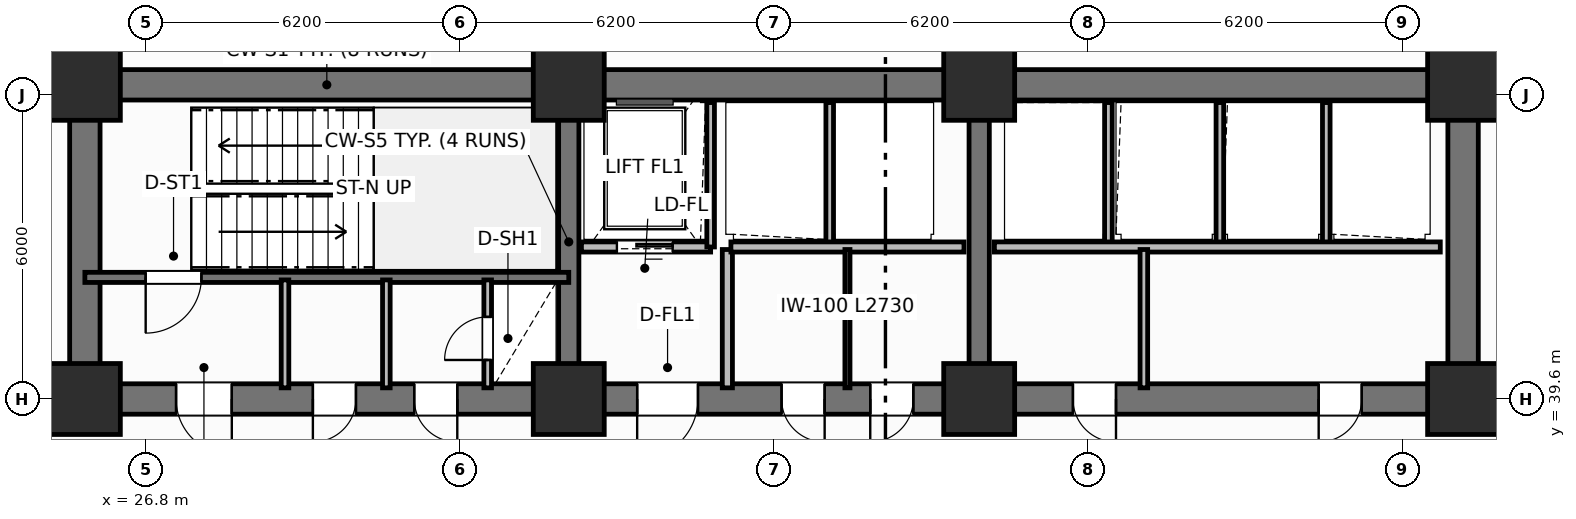
"""IFC4 building model, lengths in metres.
Left out: names, types, materials, properties, quantities, classifications, styles, units other than length and angle.
Written with IfcOpenShell. Run it as: python <this file> out.ifc"""

import sys

from ifc_helpers import new_model, si_unit, direction, frame, frame_2d, origin, origin_2d, place, context, subcontext, project, spatial, rectangle, extrude, element, fill, save


model = new_model("IFC4")
c1 = context("Model", 3, precision=1e-05, world=origin(), true_north=direction((0.0, 1.0)))
c2 = subcontext(c1, "Body", "Model", "MODEL_VIEW")
j1 = project(units=[si_unit("LENGTHUNIT", "METRE"), si_unit("PLANEANGLEUNIT", "RADIAN")], contexts=[c1])
p1 = place(None, origin())
s1 = spatial("IfcSite", under=j1, at=p1, CompositionType="ELEMENT")
p2 = place(p1, origin())
s2 = spatial("IfcBuilding", under=s1, at=p2, CompositionType="ELEMENT")
p3 = place(p2, frame((0.0, 0.0, 15.6)))
s3 = spatial("IfcBuildingStorey", under=s2, at=p3, CompositionType="ELEMENT", Elevation=15.6)
p4 = place(p3, frame((25.6, 45.8, 0.0), z_axis=(0.0, 0.0, 1.0), x_axis=(1.0, 0.0, 0.0)))
e1 = element("IfcWall", 1, at=p4, inside=s3, PredefinedType="SHEAR", context=c2, shape_type="SweptSolid", body=[
    extrude(rectangle(XDim=27.2, YDim=0.6, at=frame_2d((13.6, 0.0))), origin(), (0.0, 0.0, 1.0), 4.5),
])
for number, where, z_axis, x_axis in (
    (2, (25.6, 39.9, 0.0), (0.0, 0.0, 1.0), (0.0, 1.0, 0.0)),
    (3, (52.8, 39.9, 0.0), (0.0, 0.0, 1.0), (0.0, 1.0, 0.0)),
):
    element("IfcWall", number, at=place(p3, frame(where, z_axis=z_axis, x_axis=x_axis)), inside=s3, PredefinedType="SHEAR", context=c2, shape_type="SweptSolid", body=[
        extrude(rectangle(XDim=5.6, YDim=0.6, at=frame_2d((2.8, 0.0))), origin(), (0.0, 0.0, 1.0), 4.5),
    ])
p5 = place(p3, frame((52.8, 39.6, 0.0), z_axis=(0.0, 0.0, 1.0), x_axis=(-1.0, 0.0, 0.0)))
e4 = element("IfcWall", 4, at=p5, inside=s3, PredefinedType="SHEAR", context=c2, shape_type="SweptSolid", body=[
    extrude(rectangle(XDim=27.2, YDim=0.6, at=frame_2d((13.6, 0.0))), origin(), (0.0, 0.0, 1.0), 4.5),
])
p6 = place(p5, frame((24.3, 0.0, 0.0)))
e5 = element("IfcOpeningElement", 5, at=p6, cuts=e4, PredefinedType="OPENING", context=c2, shape_type="SweptSolid", body=[
    extrude(rectangle(XDim=1.1, YDim=2.15, at=frame_2d((0.55, 1.075))), frame((0.0, 0.31, 0.0), z_axis=(0.0, -1.0, 0.0), x_axis=(1.0, 0.0, 0.0)), (0.0, 0.0, 1.0), 0.62),
])
p7 = place(p5, frame((21.85, 0.0, 0.0)))
e6 = element("IfcOpeningElement", 6, at=p7, cuts=e4, PredefinedType="OPENING", context=c2, shape_type="SweptSolid", body=[
    extrude(rectangle(XDim=0.85, YDim=2.1, at=frame_2d((0.425, 1.05))), frame((0.0, 0.31, 0.0), z_axis=(0.0, -1.0, 0.0), x_axis=(1.0, 0.0, 0.0)), (0.0, 0.0, 1.0), 0.62),
])
p8 = place(p5, frame((19.85, 0.0, 0.0)))
e7 = element("IfcOpeningElement", 7, at=p8, cuts=e4, PredefinedType="OPENING", context=c2, shape_type="SweptSolid", body=[
    extrude(rectangle(XDim=0.85, YDim=2.1, at=frame_2d((0.425, 1.05))), frame((0.0, 0.31, 0.0), z_axis=(0.0, -1.0, 0.0), x_axis=(1.0, 0.0, 0.0)), (0.0, 0.0, 1.0), 0.62),
])
p9 = place(p5, frame((15.1, 0.0, 0.0)))
e8 = element("IfcOpeningElement", 8, at=p9, cuts=e4, PredefinedType="OPENING", context=c2, shape_type="SweptSolid", body=[
    extrude(rectangle(XDim=1.2, YDim=2.15, at=frame_2d((0.6, 1.075))), frame((0.0, 0.31, 0.0), z_axis=(0.0, -1.0, 0.0), x_axis=(1.0, 0.0, 0.0)), (0.0, 0.0, 1.0), 0.62),
])
p10 = place(p5, frame((12.6, 0.0, 0.0)))
e9 = element("IfcOpeningElement", 9, at=p10, cuts=e4, PredefinedType="OPENING", context=c2, shape_type="SweptSolid", body=[
    extrude(rectangle(XDim=0.85, YDim=2.1, at=frame_2d((0.425, 1.05))), frame((0.0, 0.31, 0.0), z_axis=(0.0, -1.0, 0.0), x_axis=(1.0, 0.0, 0.0)), (0.0, 0.0, 1.0), 0.62),
])
p11 = place(p5, frame((10.85, 0.0, 0.0)))
e10 = element("IfcOpeningElement", 10, at=p11, cuts=e4, PredefinedType="OPENING", context=c2, shape_type="SweptSolid", body=[
    extrude(rectangle(XDim=0.85, YDim=2.1, at=frame_2d((0.425, 1.05))), frame((0.0, 0.31, 0.0), z_axis=(0.0, -1.0, 0.0), x_axis=(1.0, 0.0, 0.0)), (0.0, 0.0, 1.0), 0.62),
])
p12 = place(p5, frame((6.85, 0.0, 0.0)))
e11 = element("IfcOpeningElement", 11, at=p12, cuts=e4, PredefinedType="OPENING", context=c2, shape_type="SweptSolid", body=[
    extrude(rectangle(XDim=0.85, YDim=2.1, at=frame_2d((0.425, 1.05))), frame((0.0, 0.31, 0.0), z_axis=(0.0, -1.0, 0.0), x_axis=(1.0, 0.0, 0.0)), (0.0, 0.0, 1.0), 0.62),
])
p13 = place(p5, frame((2.0, 0.0, 0.0)))
e12 = element("IfcOpeningElement", 12, at=p13, cuts=e4, PredefinedType="OPENING", context=c2, shape_type="SweptSolid", body=[
    extrude(rectangle(XDim=0.85, YDim=2.1, at=frame_2d((0.425, 1.05))), frame((0.0, 0.31, 0.0), z_axis=(0.0, -1.0, 0.0), x_axis=(1.0, 0.0, 0.0)), (0.0, 0.0, 1.0), 0.62),
])
for number, where, z_axis, x_axis in (
    (13, (35.15, 39.9, 0.0), (0.0, 0.0, 1.0), (0.0, 1.0, 0.0)),
    (14, (43.25, 39.9, 0.0), (0.0, 0.0, 1.0), (0.0, 1.0, 0.0)),
):
    element("IfcWall", number, at=place(p3, frame(where, z_axis=z_axis, x_axis=x_axis)), inside=s3, PredefinedType="SHEAR", context=c2, shape_type="SweptSolid", body=[
        extrude(rectangle(XDim=5.6, YDim=0.4, at=frame_2d((2.8, 0.0))), origin(), (0.0, 0.0, 1.0), 4.5),
    ])
for number, where, z_axis, x_axis in (
    (15, (25.6, 39.6, 0.0), (0.0, 0.0, 1.0), (1.0, 0.0, 0.0)),
    (16, (25.6, 45.8, 0.0), (0.0, 0.0, 1.0), (1.0, 0.0, 0.0)),
    (17, (35.15, 39.6, 0.0), (0.0, 0.0, 1.0), (1.0, 0.0, 0.0)),
    (18, (35.15, 45.8, 0.0), (0.0, 0.0, 1.0), (1.0, 0.0, 0.0)),
    (19, (43.25, 39.6, 0.0), (0.0, 0.0, 1.0), (1.0, 0.0, 0.0)),
    (20, (43.25, 45.8, 0.0), (0.0, 0.0, 1.0), (1.0, 0.0, 0.0)),
    (21, (52.8, 39.6, 0.0), (0.0, 0.0, 1.0), (1.0, 0.0, 0.0)),
    (22, (52.8, 45.8, 0.0), (0.0, 0.0, 1.0), (1.0, 0.0, 0.0)),
):
    element("IfcColumn", number, at=place(p3, frame(where, z_axis=z_axis, x_axis=x_axis)), inside=s3, PredefinedType="COLUMN", context=c2, shape_type="SweptSolid", body=[
        extrude(rectangle(XDim=1.4, YDim=1.4, at=origin_2d()), origin(), (0.0, 0.0, 1.0), 4.5),
    ])
p14 = place(p3, frame((35.15, 42.0, 0.0), z_axis=(0.0, 0.0, 1.0), x_axis=(-1.0, 0.0, 0.0)))
e23 = element("IfcWall", 23, at=p14, inside=s3, PredefinedType="SHEAR", context=c2, shape_type="SweptSolid", body=[
    extrude(rectangle(XDim=9.55, YDim=0.2, at=frame_2d((4.775, 0.0))), origin(), (0.0, 0.0, 1.0), 4.5),
])
p15 = place(p14, frame((7.25, 0.0, 0.0)))
e24 = element("IfcOpeningElement", 24, at=p15, cuts=e23, PredefinedType="OPENING", context=c2, shape_type="SweptSolid", body=[
    extrude(rectangle(XDim=1.1, YDim=2.15, at=frame_2d((0.55, 1.075))), frame((0.0, 0.11, 0.0), z_axis=(0.0, -1.0, 0.0), x_axis=(1.0, 0.0, 0.0)), (0.0, 0.0, 1.0), 0.22),
])
p16 = place(p3, frame((33.55, 39.82, 0.0), z_axis=(0.0, 0.0, 1.0), x_axis=(0.0, 1.0, 0.0)))
e25 = element("IfcWall", 25, at=p16, inside=s3, PredefinedType="PARTITIONING", context=c2, shape_type="SweptSolid", body=[
    extrude(rectangle(XDim=2.13, YDim=0.15, at=frame_2d((1.065, 0.0))), origin(), (0.0, 0.0, 1.0), 3.42),
])
p17 = place(p16, frame((0.55, 0.0, 0.0)))
e26 = element("IfcOpeningElement", 26, at=p17, cuts=e25, PredefinedType="OPENING", context=c2, shape_type="SweptSolid", body=[
    extrude(rectangle(XDim=0.85, YDim=2.05, at=frame_2d((0.425, 1.025))), frame((0.0, 0.085, 0.0), z_axis=(0.0, -1.0, 0.0), x_axis=(1.0, 0.0, 0.0)), (0.0, 0.0, 1.0), 0.17),
])
for number, where, z_axis, x_axis in (
    (27, (29.55, 39.82, 0.0), (0.0, 0.0, 1.0), (0.0, 1.0, 0.0)),
    (28, (31.55, 39.82, 0.0), (0.0, 0.0, 1.0), (0.0, 1.0, 0.0)),
):
    element("IfcWall", number, at=place(p3, frame(where, z_axis=z_axis, x_axis=x_axis)), inside=s3, PredefinedType="PARTITIONING", context=c2, shape_type="SweptSolid", body=[
        extrude(rectangle(XDim=2.13, YDim=0.15, at=frame_2d((1.065, 0.0))), origin(), (0.0, 0.0, 1.0), 3.42),
    ])
p18 = place(p3, frame((37.95, 42.6, 0.0), z_axis=(0.0, 0.0, 1.0), x_axis=(-1.0, 0.0, 0.0)))
e29 = element("IfcWall", 29, at=p18, inside=s3, PredefinedType="PARTITIONING", context=c2, shape_type="SweptSolid", body=[
    extrude(rectangle(XDim=2.55, YDim=0.2, at=frame_2d((1.275, 0.0))), origin(), (0.0, 0.0, 1.0), 3.08),
])
p19 = place(p18, frame((0.75, 0.0, 0.0)))
e30 = element("IfcOpeningElement", 30, at=p19, cuts=e29, PredefinedType="OPENING", context=c2, shape_type="SweptSolid", body=[
    extrude(rectangle(XDim=1.1, YDim=2.15, at=frame_2d((0.55, 1.075))), frame((0.0, 0.11, 0.0), z_axis=(0.0, -1.0, 0.0), x_axis=(1.0, 0.0, 0.0)), (0.0, 0.0, 1.0), 0.22),
])
p20 = place(p3, frame((37.95, 42.6, 0.0), z_axis=(0.0, 0.0, 1.0), x_axis=(0.0, 1.0, 0.0)))
e31 = element("IfcWall", 31, at=p20, inside=s3, PredefinedType="PARTITIONING", context=c2, shape_type="SweptSolid", body=[
    extrude(rectangle(XDim=2.85, YDim=0.15, at=frame_2d((1.425, 0.0))), origin(), (0.0, 0.0, 1.0), 3.42),
])
p21 = place(p3, frame((38.28, 39.82, 0.0), z_axis=(0.0, 0.0, 1.0), x_axis=(0.0, 1.0, 0.0)))
e32 = element("IfcWall", 32, at=p21, inside=s3, PredefinedType="PARTITIONING", context=c2, shape_type="SweptSolid", body=[
    extrude(rectangle(XDim=2.73, YDim=0.2, at=frame_2d((1.365, 0.0))), origin(), (0.0, 0.0, 1.0), 3.42),
])
p22 = place(p3, frame((40.3, 42.65, 0.0), z_axis=(0.0, 0.0, 1.0), x_axis=(0.0, 1.0, 0.0)))
e33 = element("IfcWall", 33, at=p22, inside=s3, PredefinedType="PARTITIONING", context=c2, shape_type="SweptSolid", body=[
    extrude(rectangle(XDim=2.8, YDim=0.15, at=frame_2d((1.4, 0.0))), origin(), (0.0, 0.0, 1.0), 3.42),
])
p23 = place(p3, frame((42.95, 42.6, 0.0), z_axis=(0.0, 0.0, 1.0), x_axis=(-1.0, 0.0, 0.0)))
e34 = element("IfcWall", 34, at=p23, inside=s3, PredefinedType="PARTITIONING", context=c2, shape_type="SweptSolid", body=[
    extrude(rectangle(XDim=4.6, YDim=0.2, at=frame_2d((2.3, 0.0))), origin(), (0.0, 0.0, 1.0), 3.08),
])
p24 = place(p3, frame((40.65, 39.82, 0.0), z_axis=(0.0, 0.0, 1.0), x_axis=(0.0, 1.0, 0.0)))
e35 = element("IfcWall", 35, at=p24, inside=s3, PredefinedType="PARTITIONING", context=c2, shape_type="SweptSolid", body=[
    extrude(rectangle(XDim=2.73, YDim=0.1, at=frame_2d((1.365, 0.0))), origin(), (0.0, 0.0, 1.0), 3.42),
])
for number, where, z_axis, x_axis in (
    (36, (45.8, 42.65, 0.0), (0.0, 0.0, 1.0), (0.0, 1.0, 0.0)),
    (37, (48.0, 42.65, 0.0), (0.0, 0.0, 1.0), (0.0, 1.0, 0.0)),
    (38, (50.1, 42.65, 0.0), (0.0, 0.0, 1.0), (0.0, 1.0, 0.0)),
):
    element("IfcWall", number, at=place(p3, frame(where, z_axis=z_axis, x_axis=x_axis)), inside=s3, PredefinedType="PARTITIONING", context=c2, shape_type="SweptSolid", body=[
        extrude(rectangle(XDim=2.8, YDim=0.15, at=frame_2d((1.4, 0.0))), origin(), (0.0, 0.0, 1.0), 3.42),
    ])
p25 = place(p3, frame((52.35, 42.6, 0.0), z_axis=(0.0, 0.0, 1.0), x_axis=(-1.0, 0.0, 0.0)))
e39 = element("IfcWall", 39, at=p25, inside=s3, PredefinedType="PARTITIONING", context=c2, shape_type="SweptSolid", body=[
    extrude(rectangle(XDim=8.8, YDim=0.2, at=frame_2d((4.4, 0.0))), origin(), (0.0, 0.0, 1.0), 3.42),
])
p26 = place(p3, frame((46.5, 39.82, 0.0), z_axis=(0.0, 0.0, 1.0), x_axis=(0.0, 1.0, 0.0)))
e40 = element("IfcWall", 40, at=p26, inside=s3, PredefinedType="PARTITIONING", context=c2, shape_type="SweptSolid", body=[
    extrude(rectangle(XDim=2.73, YDim=0.15, at=frame_2d((1.365, 0.0))), origin(), (0.0, 0.0, 1.0), 3.42),
])
p27 = place(p3, frame((25.25, 39.55, 0.0), z_axis=(0.0, 0.0, 1.0), x_axis=(-1.0, 0.0, 0.0)))
e41 = element("IfcWall", 41, at=p27, inside=s3, PredefinedType="PARTITIONING", context=c2, shape_type="SweptSolid", body=[
    extrude(rectangle(XDim=13.25, YDim=0.15, at=frame_2d((6.625, 0.0))), origin(), (0.0, 0.0, 1.0), 3.42),
])
p28 = place(p27, frame((4.2, 0.0, 0.0)))
e42 = element("IfcOpeningElement", 42, at=p28, cuts=e41, PredefinedType="OPENING", context=c2, shape_type="SweptSolid", body=[
    extrude(rectangle(XDim=1.0, YDim=2.15, at=frame_2d((0.5, 1.075))), frame((0.0, 0.085, 0.0), z_axis=(0.0, -1.0, 0.0), x_axis=(1.0, 0.0, 0.0)), (0.0, 0.0, 1.0), 0.17),
])
p29 = place(p3, frame((66.4, 39.55, 0.0), z_axis=(0.0, 0.0, 1.0), x_axis=(-1.0, 0.0, 0.0)))
e43 = element("IfcWall", 43, at=p29, inside=s3, PredefinedType="PARTITIONING", context=c2, shape_type="SweptSolid", body=[
    extrude(rectangle(XDim=13.25, YDim=0.15, at=frame_2d((6.625, 0.0))), origin(), (0.0, 0.0, 1.0), 3.42),
])
p30 = place(p29, frame((5.5, 0.0, 0.0)))
e44 = element("IfcOpeningElement", 44, at=p30, cuts=e43, PredefinedType="OPENING", context=c2, shape_type="SweptSolid", body=[
    extrude(rectangle(XDim=1.0, YDim=2.15, at=frame_2d((0.5, 1.075))), frame((0.0, 0.085, 0.0), z_axis=(0.0, -1.0, 0.0), x_axis=(1.0, 0.0, 0.0)), (0.0, 0.0, 1.0), 0.17),
])
p31 = place(p15, origin())
e45 = element("IfcDoor", 45, at=p31, inside=s3, OperationType="SINGLE_SWING_RIGHT", PredefinedType="DOOR", context=c2, shape_type="SweptSolid", body=[
    extrude(rectangle(XDim=1.1, YDim=2.15, at=frame_2d((0.55, 1.075))), frame((0.0, 0.025, 0.0), z_axis=(0.0, -1.0, 0.0), x_axis=(1.0, 0.0, 0.0)), (0.0, 0.0, 1.0), 0.05),
])
fill(e24, e45)
p32 = place(p17, origin())
e46 = element("IfcDoor", 46, at=p32, inside=s3, OperationType="SINGLE_SWING_LEFT", PredefinedType="TRAPDOOR", context=c2, shape_type="SweptSolid", body=[
    extrude(rectangle(XDim=0.85, YDim=2.05, at=frame_2d((0.425, 1.025))), frame((0.0, 0.025, 0.0), z_axis=(0.0, -1.0, 0.0), x_axis=(1.0, 0.0, 0.0)), (0.0, 0.0, 1.0), 0.05),
])
fill(e26, e46)
p33 = place(p19, origin())
e47 = element("IfcDoor", 47, at=p33, inside=s3, OperationType="SLIDING_TO_LEFT", PredefinedType="DOOR", context=c2, shape_type="SweptSolid", body=[
    extrude(rectangle(XDim=1.1, YDim=2.15, at=frame_2d((0.55, 1.075))), frame((0.0, 0.025, 0.0), z_axis=(0.0, -1.0, 0.0), x_axis=(1.0, 0.0, 0.0)), (0.0, 0.0, 1.0), 0.05),
])
fill(e30, e47)
p34 = place(p6, origin())
e48 = element("IfcDoor", 48, at=p34, inside=s3, OperationType="SINGLE_SWING_LEFT", PredefinedType="DOOR", context=c2, shape_type="SweptSolid", body=[
    extrude(rectangle(XDim=1.1, YDim=2.15, at=frame_2d((0.55, 1.075))), frame((0.0, 0.025, 0.0), z_axis=(0.0, -1.0, 0.0), x_axis=(1.0, 0.0, 0.0)), (0.0, 0.0, 1.0), 0.05),
])
fill(e5, e48)
p35 = place(p7, origin())
e49 = element("IfcDoor", 49, at=p35, inside=s3, OperationType="SINGLE_SWING_RIGHT", PredefinedType="DOOR", context=c2, shape_type="SweptSolid", body=[
    extrude(rectangle(XDim=0.85, YDim=2.1, at=frame_2d((0.425, 1.05))), frame((0.0, 0.025, 0.0), z_axis=(0.0, -1.0, 0.0), x_axis=(1.0, 0.0, 0.0)), (0.0, 0.0, 1.0), 0.05),
])
fill(e6, e49)
p36 = place(p8, origin())
e50 = element("IfcDoor", 50, at=p36, inside=s3, OperationType="SINGLE_SWING_LEFT", PredefinedType="DOOR", context=c2, shape_type="SweptSolid", body=[
    extrude(rectangle(XDim=0.85, YDim=2.1, at=frame_2d((0.425, 1.05))), frame((0.0, 0.025, 0.0), z_axis=(0.0, -1.0, 0.0), x_axis=(1.0, 0.0, 0.0)), (0.0, 0.0, 1.0), 0.05),
])
fill(e7, e50)
p37 = place(p9, origin())
e51 = element("IfcDoor", 51, at=p37, inside=s3, OperationType="SINGLE_SWING_RIGHT", PredefinedType="DOOR", context=c2, shape_type="SweptSolid", body=[
    extrude(rectangle(XDim=1.2, YDim=2.15, at=frame_2d((0.6, 1.075))), frame((0.0, 0.025, 0.0), z_axis=(0.0, -1.0, 0.0), x_axis=(1.0, 0.0, 0.0)), (0.0, 0.0, 1.0), 0.05),
])
fill(e8, e51)
p38 = place(p10, origin())
e52 = element("IfcDoor", 52, at=p38, inside=s3, OperationType="SINGLE_SWING_LEFT", PredefinedType="DOOR", context=c2, shape_type="SweptSolid", body=[
    extrude(rectangle(XDim=0.85, YDim=2.1, at=frame_2d((0.425, 1.05))), frame((0.0, 0.025, 0.0), z_axis=(0.0, -1.0, 0.0), x_axis=(1.0, 0.0, 0.0)), (0.0, 0.0, 1.0), 0.05),
])
fill(e9, e52)
p39 = place(p11, origin())
e53 = element("IfcDoor", 53, at=p39, inside=s3, OperationType="SINGLE_SWING_RIGHT", PredefinedType="DOOR", context=c2, shape_type="SweptSolid", body=[
    extrude(rectangle(XDim=0.85, YDim=2.1, at=frame_2d((0.425, 1.05))), frame((0.0, 0.025, 0.0), z_axis=(0.0, -1.0, 0.0), x_axis=(1.0, 0.0, 0.0)), (0.0, 0.0, 1.0), 0.05),
])
fill(e10, e53)
p40 = place(p12, origin())
e54 = element("IfcDoor", 54, at=p40, inside=s3, OperationType="SINGLE_SWING_LEFT", PredefinedType="DOOR", context=c2, shape_type="SweptSolid", body=[
    extrude(rectangle(XDim=0.85, YDim=2.1, at=frame_2d((0.425, 1.05))), frame((0.0, 0.025, 0.0), z_axis=(0.0, -1.0, 0.0), x_axis=(1.0, 0.0, 0.0)), (0.0, 0.0, 1.0), 0.05),
])
fill(e11, e54)
p41 = place(p13, origin())
e55 = element("IfcDoor", 55, at=p41, inside=s3, OperationType="SINGLE_SWING_RIGHT", PredefinedType="DOOR", context=c2, shape_type="SweptSolid", body=[
    extrude(rectangle(XDim=0.85, YDim=2.1, at=frame_2d((0.425, 1.05))), frame((0.0, 0.025, 0.0), z_axis=(0.0, -1.0, 0.0), x_axis=(1.0, 0.0, 0.0)), (0.0, 0.0, 1.0), 0.05),
])
fill(e12, e55)
save(model, sys.argv[1])
